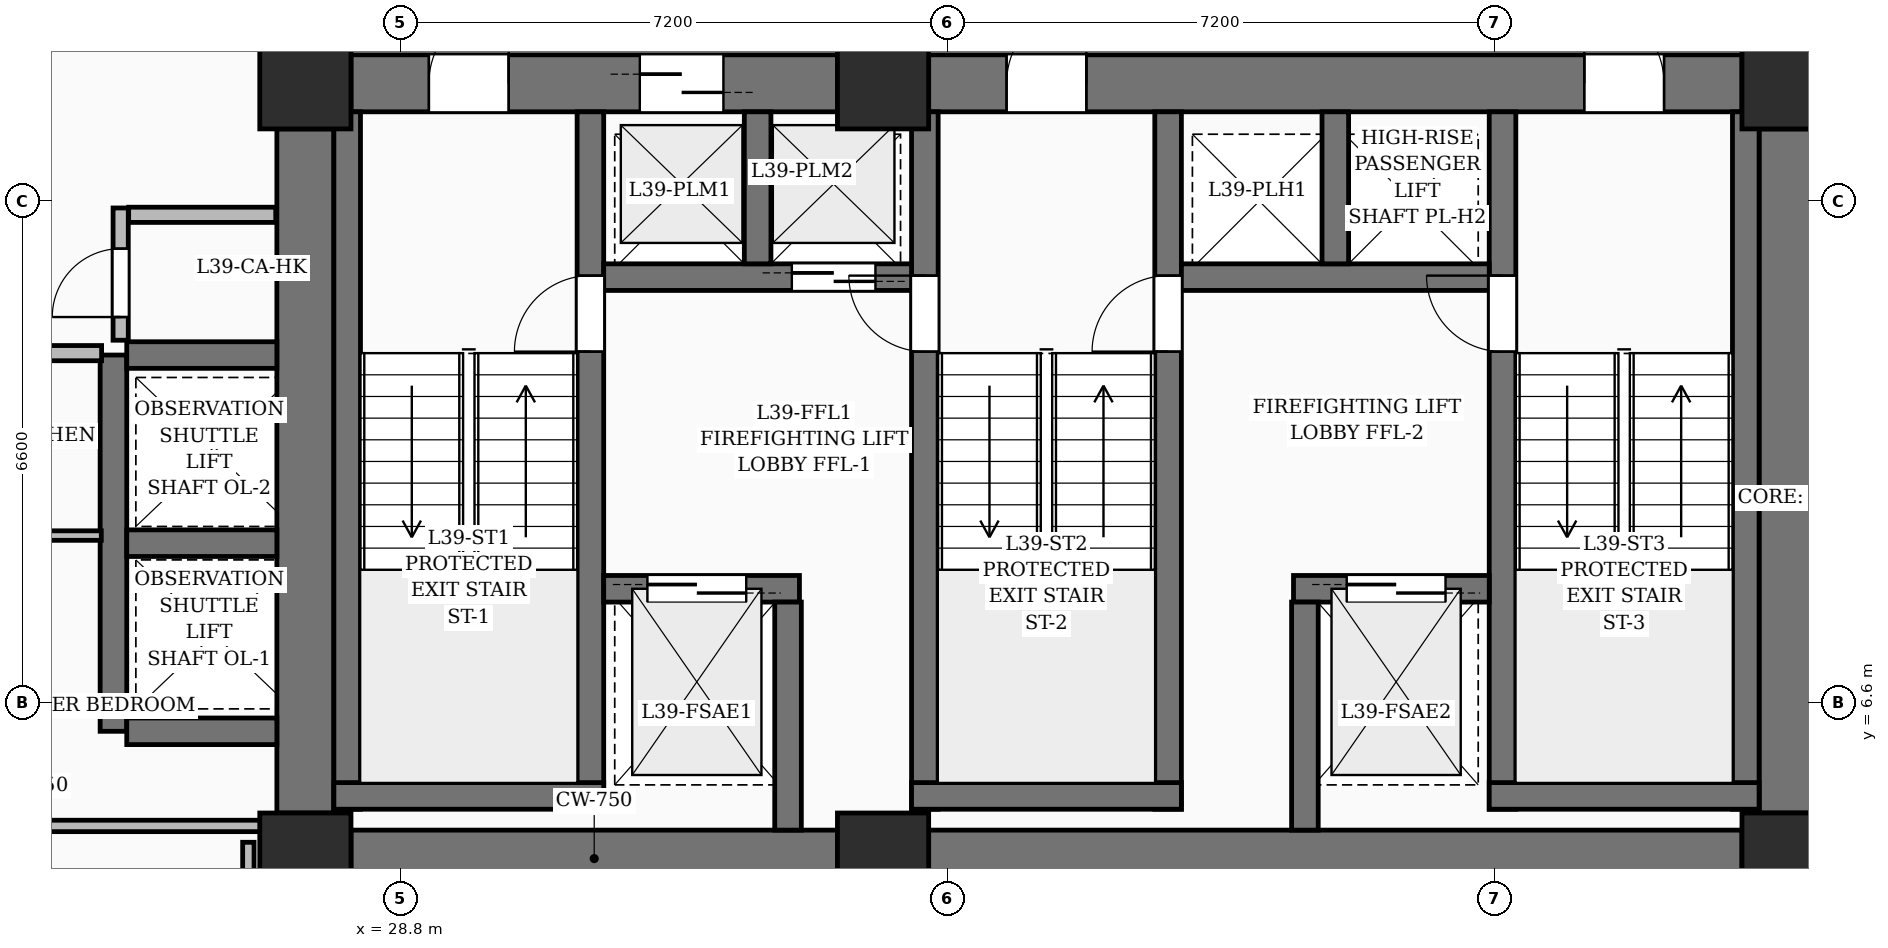
"""IFC4 building model, lengths in metres.
Left out: names, types, materials, properties, quantities, classifications, styles, units other than length and angle.
Written with IfcOpenShell. Run it as: python <this file> out.ifc"""

import sys

from ifc_helpers import new_model, si_unit, direction, frame, frame_2d, origin, origin_2d, place, context, subcontext, project, spatial, rectangle, extrude, element, fill, save


model = new_model("IFC4")
c1 = context("Model", 3, precision=1e-05, world=origin(), true_north=direction((0.0, 1.0)))
c2 = subcontext(c1, "Body", "Model", "MODEL_VIEW")
j1 = project(units=[si_unit("LENGTHUNIT", "METRE"), si_unit("PLANEANGLEUNIT", "RADIAN")], contexts=[c1])
p1 = place(None, origin())
s1 = spatial("IfcSite", under=j1, at=p1, CompositionType="ELEMENT")
p2 = place(p1, origin())
s2 = spatial("IfcBuilding", under=s1, at=p2, CompositionType="ELEMENT")
p3 = place(p2, frame((0.0, 0.0, 153.6)))
s3 = spatial("IfcBuildingStorey", under=s2, at=p3, CompositionType="ELEMENT", Elevation=153.6)
for number, where, z_axis, x_axis in (
    (1, (27.55, 4.55, 0.0), (0.0, 0.0, 1.0), (1.0, 0.0, 0.0)),
    (2, (35.15, 4.55, 0.0), (0.0, 0.0, 1.0), (1.0, 0.0, 0.0)),
    (3, (47.05, 4.55, 0.0), (0.0, 0.0, 1.0), (1.0, 0.0, 0.0)),
    (4, (27.55, 14.75, 0.0), (0.0, 0.0, 1.0), (1.0, 0.0, 0.0)),
    (5, (35.15, 14.75, 0.0), (0.0, 0.0, 1.0), (1.0, 0.0, 0.0)),
    (6, (47.05, 14.75, 0.0), (0.0, 0.0, 1.0), (1.0, 0.0, 0.0)),
):
    element("IfcColumn", number, at=place(p3, frame(where, z_axis=z_axis, x_axis=x_axis)), inside=s3, PredefinedType="COLUMN", context=c2, shape_type="SweptSolid", body=[
        extrude(rectangle(XDim=1.2, YDim=1.2, at=origin_2d()), origin(), (0.0, 0.0, 1.0), 3.6),
    ])
p4 = place(p3, frame((28.15, 4.55, 0.0), z_axis=(0.0, 0.0, 1.0), x_axis=(1.0, 0.0, 0.0)))
e7 = element("IfcWall", 7, at=p4, inside=s3, PredefinedType="SHEAR", context=c2, shape_type="SweptSolid", body=[
    extrude(rectangle(XDim=6.4, YDim=0.75, at=frame_2d((3.2, 0.0))), origin(), (0.0, 0.0, 1.0), 3.6),
])
p5 = place(p3, frame((35.75, 4.55, 0.0), z_axis=(0.0, 0.0, 1.0), x_axis=(1.0, 0.0, 0.0)))
e8 = element("IfcWall", 8, at=p5, inside=s3, PredefinedType="SHEAR", context=c2, shape_type="SweptSolid", body=[
    extrude(rectangle(XDim=10.7, YDim=0.75, at=frame_2d((5.35, 0.0))), origin(), (0.0, 0.0, 1.0), 3.6),
])
p6 = place(p3, frame((28.15, 14.75, 0.0), z_axis=(0.0, 0.0, 1.0), x_axis=(1.0, 0.0, 0.0)))
e9 = element("IfcWall", 9, at=p6, inside=s3, PredefinedType="SHEAR", context=c2, shape_type="SweptSolid", body=[
    extrude(rectangle(XDim=6.4, YDim=0.75, at=frame_2d((3.2, 0.0))), origin(), (0.0, 0.0, 1.0), 3.6),
])
p7 = place(p6, frame((1.025, 0.0, 0.0)))
e10 = element("IfcOpeningElement", 10, at=p7, cuts=e9, PredefinedType="OPENING", context=c2, shape_type="SweptSolid", body=[
    extrude(rectangle(XDim=1.05, YDim=2.15, at=frame_2d((0.525, 1.075))), frame((0.0, 0.385, 0.0), z_axis=(0.0, -1.0, 0.0), x_axis=(1.0, 0.0, 0.0)), (0.0, 0.0, 1.0), 0.77),
])
p8 = place(p6, frame((3.8, 0.0, 0.0)))
e11 = element("IfcOpeningElement", 11, at=p8, cuts=e9, PredefinedType="OPENING", context=c2, shape_type="SweptSolid", body=[
    extrude(rectangle(XDim=1.1, YDim=2.2, at=frame_2d((0.55, 1.1))), frame((0.0, 0.385, 0.0), z_axis=(0.0, -1.0, 0.0), x_axis=(1.0, 0.0, 0.0)), (0.0, 0.0, 1.0), 0.77),
])
p9 = place(p3, frame((35.75, 14.75, 0.0), z_axis=(0.0, 0.0, 1.0), x_axis=(1.0, 0.0, 0.0)))
e12 = element("IfcWall", 12, at=p9, inside=s3, PredefinedType="SHEAR", context=c2, shape_type="SweptSolid", body=[
    extrude(rectangle(XDim=10.7, YDim=0.75, at=frame_2d((5.35, 0.0))), origin(), (0.0, 0.0, 1.0), 3.6),
])
p10 = place(p9, frame((1.025, 0.0, 0.0)))
e13 = element("IfcOpeningElement", 13, at=p10, cuts=e12, PredefinedType="OPENING", context=c2, shape_type="SweptSolid", body=[
    extrude(rectangle(XDim=1.05, YDim=2.15, at=frame_2d((0.525, 1.075))), frame((0.0, 0.385, 0.0), z_axis=(0.0, -1.0, 0.0), x_axis=(1.0, 0.0, 0.0)), (0.0, 0.0, 1.0), 0.77),
])
p11 = place(p9, frame((8.625, 0.0, 0.0)))
e14 = element("IfcOpeningElement", 14, at=p11, cuts=e12, PredefinedType="OPENING", context=c2, shape_type="SweptSolid", body=[
    extrude(rectangle(XDim=1.05, YDim=2.15, at=frame_2d((0.525, 1.075))), frame((0.0, 0.385, 0.0), z_axis=(0.0, -1.0, 0.0), x_axis=(1.0, 0.0, 0.0)), (0.0, 0.0, 1.0), 0.77),
])
for number, where, z_axis, x_axis in (
    (15, (27.55, 5.15, 0.0), (0.0, 0.0, 1.0), (0.0, 1.0, 0.0)),
    (16, (47.05, 5.15, 0.0), (0.0, 0.0, 1.0), (0.0, 1.0, 0.0)),
):
    element("IfcWall", number, at=place(p3, frame(where, z_axis=z_axis, x_axis=x_axis)), inside=s3, PredefinedType="SHEAR", context=c2, shape_type="SweptSolid", body=[
        extrude(rectangle(XDim=9.0, YDim=0.75, at=frame_2d((4.5, 0.0))), origin(), (0.0, 0.0, 1.0), 3.6),
    ])
p12 = place(p3, frame((28.1, 5.2, 0.0), z_axis=(0.0, 0.0, 1.0), x_axis=(0.0, 1.0, 0.0)))
e17 = element("IfcWall", 17, at=p12, inside=s3, PredefinedType="SOLIDWALL", context=c2, shape_type="SweptSolid", body=[
    extrude(rectangle(XDim=9.175, YDim=0.35, at=frame_2d((4.587, 0.0))), origin(), (0.0, 0.0, 1.0), 3.6),
])
p13 = place(p3, frame((31.3, 5.2, 0.0), z_axis=(0.0, 0.0, 1.0), x_axis=(0.0, 1.0, 0.0)))
e18 = element("IfcWall", 18, at=p13, inside=s3, PredefinedType="SOLIDWALL", context=c2, shape_type="SweptSolid", body=[
    extrude(rectangle(XDim=9.175, YDim=0.35, at=frame_2d((4.587, 0.0))), origin(), (0.0, 0.0, 1.0), 3.6),
])
p14 = place(p13, frame((6.02, 0.0, 0.0)))
e19 = element("IfcOpeningElement", 19, at=p14, cuts=e18, PredefinedType="OPENING", context=c2, shape_type="SweptSolid", body=[
    extrude(rectangle(XDim=1.0, YDim=2.15, at=frame_2d((0.5, 1.075))), frame((0.0, 0.185, 0.0), z_axis=(0.0, -1.0, 0.0), x_axis=(1.0, 0.0, 0.0)), (0.0, 0.0, 1.0), 0.37),
])
p15 = place(p3, frame((27.925, 5.375, 0.0), z_axis=(0.0, 0.0, 1.0), x_axis=(1.0, 0.0, 0.0)))
e20 = element("IfcWall", 20, at=p15, inside=s3, PredefinedType="SOLIDWALL", context=c2, shape_type="SweptSolid", body=[
    extrude(rectangle(XDim=3.55, YDim=0.35, at=frame_2d((1.775, 0.0))), origin(), (0.0, 0.0, 1.0), 3.6),
])
p16 = place(p3, frame((35.7, 5.2, 0.0), z_axis=(0.0, 0.0, 1.0), x_axis=(0.0, 1.0, 0.0)))
e21 = element("IfcWall", 21, at=p16, inside=s3, PredefinedType="SOLIDWALL", context=c2, shape_type="SweptSolid", body=[
    extrude(rectangle(XDim=9.175, YDim=0.35, at=frame_2d((4.587, 0.0))), origin(), (0.0, 0.0, 1.0), 3.6),
])
p17 = place(p16, frame((6.02, 0.0, 0.0)))
e22 = element("IfcOpeningElement", 22, at=p17, cuts=e21, PredefinedType="OPENING", context=c2, shape_type="SweptSolid", body=[
    extrude(rectangle(XDim=1.0, YDim=2.15, at=frame_2d((0.5, 1.075))), frame((0.0, 0.185, 0.0), z_axis=(0.0, -1.0, 0.0), x_axis=(1.0, 0.0, 0.0)), (0.0, 0.0, 1.0), 0.37),
])
p18 = place(p3, frame((38.9, 5.2, 0.0), z_axis=(0.0, 0.0, 1.0), x_axis=(0.0, 1.0, 0.0)))
e23 = element("IfcWall", 23, at=p18, inside=s3, PredefinedType="SOLIDWALL", context=c2, shape_type="SweptSolid", body=[
    extrude(rectangle(XDim=9.175, YDim=0.35, at=frame_2d((4.587, 0.0))), origin(), (0.0, 0.0, 1.0), 3.6),
])
p19 = place(p18, frame((6.02, 0.0, 0.0)))
e24 = element("IfcOpeningElement", 24, at=p19, cuts=e23, PredefinedType="OPENING", context=c2, shape_type="SweptSolid", body=[
    extrude(rectangle(XDim=1.0, YDim=2.15, at=frame_2d((0.5, 1.075))), frame((0.0, 0.185, 0.0), z_axis=(0.0, -1.0, 0.0), x_axis=(1.0, 0.0, 0.0)), (0.0, 0.0, 1.0), 0.37),
])
p20 = place(p3, frame((35.525, 5.375, 0.0), z_axis=(0.0, 0.0, 1.0), x_axis=(1.0, 0.0, 0.0)))
e25 = element("IfcWall", 25, at=p20, inside=s3, PredefinedType="SOLIDWALL", context=c2, shape_type="SweptSolid", body=[
    extrude(rectangle(XDim=3.55, YDim=0.35, at=frame_2d((1.775, 0.0))), origin(), (0.0, 0.0, 1.0), 3.6),
])
p21 = place(p3, frame((43.3, 5.2, 0.0), z_axis=(0.0, 0.0, 1.0), x_axis=(0.0, 1.0, 0.0)))
e26 = element("IfcWall", 26, at=p21, inside=s3, PredefinedType="SOLIDWALL", context=c2, shape_type="SweptSolid", body=[
    extrude(rectangle(XDim=9.175, YDim=0.35, at=frame_2d((4.587, 0.0))), origin(), (0.0, 0.0, 1.0), 3.6),
])
p22 = place(p21, frame((6.02, 0.0, 0.0)))
e27 = element("IfcOpeningElement", 27, at=p22, cuts=e26, PredefinedType="OPENING", context=c2, shape_type="SweptSolid", body=[
    extrude(rectangle(XDim=1.0, YDim=2.15, at=frame_2d((0.5, 1.075))), frame((0.0, 0.185, 0.0), z_axis=(0.0, -1.0, 0.0), x_axis=(1.0, 0.0, 0.0)), (0.0, 0.0, 1.0), 0.37),
])
p23 = place(p3, frame((46.5, 5.2, 0.0), z_axis=(0.0, 0.0, 1.0), x_axis=(0.0, 1.0, 0.0)))
e28 = element("IfcWall", 28, at=p23, inside=s3, PredefinedType="SOLIDWALL", context=c2, shape_type="SweptSolid", body=[
    extrude(rectangle(XDim=9.175, YDim=0.35, at=frame_2d((4.587, 0.0))), origin(), (0.0, 0.0, 1.0), 3.6),
])
p24 = place(p3, frame((43.125, 5.375, 0.0), z_axis=(0.0, 0.0, 1.0), x_axis=(1.0, 0.0, 0.0)))
e29 = element("IfcWall", 29, at=p24, inside=s3, PredefinedType="SOLIDWALL", context=c2, shape_type="SweptSolid", body=[
    extrude(rectangle(XDim=3.55, YDim=0.35, at=frame_2d((1.775, 0.0))), origin(), (0.0, 0.0, 1.0), 3.6),
])
p25 = place(p3, frame((31.475, 8.1, 0.0), z_axis=(0.0, 0.0, 1.0), x_axis=(1.0, 0.0, 0.0)))
e30 = element("IfcWall", 30, at=p25, inside=s3, PredefinedType="SOLIDWALL", context=c2, shape_type="SweptSolid", body=[
    extrude(rectangle(XDim=2.575, YDim=0.35, at=frame_2d((1.288, 0.0))), origin(), (0.0, 0.0, 1.0), 3.6),
])
p26 = place(p25, frame((0.575, 0.0, 0.0)))
e31 = element("IfcOpeningElement", 31, at=p26, cuts=e30, PredefinedType="OPENING", context=c2, shape_type="SweptSolid", body=[
    extrude(rectangle(XDim=1.3, YDim=2.25, at=frame_2d((0.65, 1.125))), frame((0.0, 0.185, 0.0), z_axis=(0.0, -1.0, 0.0), x_axis=(1.0, 0.0, 0.0)), (0.0, 0.0, 1.0), 0.37),
])
p27 = place(p3, frame((40.55, 8.1, 0.0), z_axis=(0.0, 0.0, 1.0), x_axis=(1.0, 0.0, 0.0)))
e32 = element("IfcWall", 32, at=p27, inside=s3, PredefinedType="SOLIDWALL", context=c2, shape_type="SweptSolid", body=[
    extrude(rectangle(XDim=2.575, YDim=0.35, at=frame_2d((1.288, 0.0))), origin(), (0.0, 0.0, 1.0), 3.6),
])
p28 = place(p27, frame((0.7, 0.0, 0.0)))
e33 = element("IfcOpeningElement", 33, at=p28, cuts=e32, PredefinedType="OPENING", context=c2, shape_type="SweptSolid", body=[
    extrude(rectangle(XDim=1.3, YDim=2.25, at=frame_2d((0.65, 1.125))), frame((0.0, 0.185, 0.0), z_axis=(0.0, -1.0, 0.0), x_axis=(1.0, 0.0, 0.0)), (0.0, 0.0, 1.0), 0.37),
])
for number, where, z_axis, x_axis in (
    (34, (33.9, 4.925, 0.0), (0.0, 0.0, 1.0), (0.0, 1.0, 0.0)),
    (35, (40.7, 4.925, 0.0), (0.0, 0.0, 1.0), (0.0, 1.0, 0.0)),
):
    element("IfcWall", number, at=place(p3, frame(where, z_axis=z_axis, x_axis=x_axis)), inside=s3, PredefinedType="SOLIDWALL", context=c2, shape_type="SweptSolid", body=[
        extrude(rectangle(XDim=3.0, YDim=0.35, at=frame_2d((1.5, 0.0))), origin(), (0.0, 0.0, 1.0), 3.6),
    ])
p29 = place(p3, frame((31.475, 12.2, 0.0), z_axis=(0.0, 0.0, 1.0), x_axis=(1.0, 0.0, 0.0)))
e36 = element("IfcWall", 36, at=p29, inside=s3, PredefinedType="SOLIDWALL", context=c2, shape_type="SweptSolid", body=[
    extrude(rectangle(XDim=4.05, YDim=0.35, at=frame_2d((2.025, 0.0))), origin(), (0.0, 0.0, 1.0), 3.6),
])
p30 = place(p29, frame((2.475, 0.0, 0.0)))
e37 = element("IfcOpeningElement", 37, at=p30, cuts=e36, PredefinedType="OPENING", context=c2, shape_type="SweptSolid", body=[
    extrude(rectangle(XDim=1.1, YDim=2.2, at=frame_2d((0.55, 1.1))), frame((0.0, 0.185, 0.0), z_axis=(0.0, -1.0, 0.0), x_axis=(1.0, 0.0, 0.0)), (0.0, 0.0, 1.0), 0.37),
])
p31 = place(p3, frame((33.5, 12.375, 0.0), z_axis=(0.0, 0.0, 1.0), x_axis=(0.0, 1.0, 0.0)))
e38 = element("IfcWall", 38, at=p31, inside=s3, PredefinedType="SOLIDWALL", context=c2, shape_type="SweptSolid", body=[
    extrude(rectangle(XDim=2.0, YDim=0.35, at=frame_2d((1.0, 0.0))), origin(), (0.0, 0.0, 1.0), 3.6),
])
p32 = place(p3, frame((39.075, 12.2, 0.0), z_axis=(0.0, 0.0, 1.0), x_axis=(1.0, 0.0, 0.0)))
e39 = element("IfcWall", 39, at=p32, inside=s3, PredefinedType="SOLIDWALL", context=c2, shape_type="SweptSolid", body=[
    extrude(rectangle(XDim=4.05, YDim=0.35, at=frame_2d((2.025, 0.0))), origin(), (0.0, 0.0, 1.0), 3.6),
])
p33 = place(p3, frame((41.1, 12.375, 0.0), z_axis=(0.0, 0.0, 1.0), x_axis=(0.0, 1.0, 0.0)))
e40 = element("IfcWall", 40, at=p33, inside=s3, PredefinedType="SOLIDWALL", context=c2, shape_type="SweptSolid", body=[
    extrude(rectangle(XDim=2.0, YDim=0.35, at=frame_2d((1.0, 0.0))), origin(), (0.0, 0.0, 1.0), 3.6),
])
p34 = place(p3, frame((25.025, 6.225, 0.0), z_axis=(0.0, 0.0, 1.0), x_axis=(0.0, 1.0, 0.0)))
e41 = element("IfcWall", 41, at=p34, inside=s3, PredefinedType="SOLIDWALL", context=c2, shape_type="SweptSolid", body=[
    extrude(rectangle(XDim=4.95, YDim=0.35, at=frame_2d((2.475, 0.0))), origin(), (0.0, 0.0, 1.0), 3.6),
])
for number, where, z_axis, x_axis in (
    (42, (25.2, 6.225, 0.0), (0.0, 0.0, 1.0), (1.0, 0.0, 0.0)),
    (43, (25.2, 8.7, 0.0), (0.0, 0.0, 1.0), (1.0, 0.0, 0.0)),
    (44, (25.2, 11.175, 0.0), (0.0, 0.0, 1.0), (1.0, 0.0, 0.0)),
):
    element("IfcWall", number, at=place(p3, frame(where, z_axis=z_axis, x_axis=x_axis)), inside=s3, PredefinedType="SOLIDWALL", context=c2, shape_type="SweptSolid", body=[
        extrude(rectangle(XDim=1.975, YDim=0.35, at=frame_2d((0.988, 0.0))), origin(), (0.0, 0.0, 1.0), 3.6),
    ])
p35 = place(p3, frame((25.12, 11.37, 0.0), z_axis=(0.0, 0.0, 1.0), x_axis=(0.0, 1.0, 0.0)))
e45 = element("IfcWall", 45, at=p35, inside=s3, PredefinedType="PARTITIONING", context=c2, shape_type="SweptSolid", body=[
    extrude(rectangle(XDim=1.74, YDim=0.2, at=frame_2d((0.87, 0.0))), origin(), (0.0, 0.0, 1.0), 3.35),
])
p36 = place(p35, frame((0.305, 0.0, 0.0)))
e46 = element("IfcOpeningElement", 46, at=p36, cuts=e45, PredefinedType="OPENING", context=c2, shape_type="SweptSolid", body=[
    extrude(rectangle(XDim=0.9, YDim=2.1, at=frame_2d((0.45, 1.05))), frame((0.0, 0.11, 0.0), z_axis=(0.0, -1.0, 0.0), x_axis=(1.0, 0.0, 0.0)), (0.0, 0.0, 1.0), 0.22),
])
p37 = place(p3, frame((25.225, 13.02, 0.0), z_axis=(0.0, 0.0, 1.0), x_axis=(1.0, 0.0, 0.0)))
e47 = element("IfcWall", 47, at=p37, inside=s3, PredefinedType="PARTITIONING", context=c2, shape_type="SweptSolid", body=[
    extrude(rectangle(XDim=1.935, YDim=0.2, at=frame_2d((0.967, 0.0))), origin(), (0.0, 0.0, 1.0), 3.35),
])
p38 = place(p3, frame((21.485, 11.2, 0.0), z_axis=(0.0, 0.0, 1.0), x_axis=(1.0, 0.0, 0.0)))
e48 = element("IfcWall", 48, at=p38, inside=s3, PredefinedType="PARTITIONING", context=c2, shape_type="SweptSolid", body=[
    extrude(rectangle(XDim=3.384, YDim=0.2, at=frame_2d((1.692, 0.0))), origin(), (0.0, 0.0, 1.0), 3.35),
])
p39 = place(p3, frame((27.175, 4.98, 0.0), z_axis=(0.0, 0.0, 1.0), x_axis=(-1.0, 0.0, 0.0)))
e49 = element("IfcWall", 49, at=p39, inside=s3, PredefinedType="PARTITIONING", context=c2, shape_type="SweptSolid", body=[
    extrude(rectangle(XDim=6.365, YDim=0.15, at=frame_2d((3.183, 0.0))), origin(), (0.0, 0.0, 1.0), 2.57),
])
p40 = place(p3, frame((26.816, 1.899, 0.0), z_axis=(0.0, 0.0, 1.0), x_axis=(0.115732894013, 0.993280371921, 0.0)))
e50 = element("IfcWall", 50, at=p40, inside=s3, PredefinedType="PARTITIONING", context=c2, shape_type="SweptSolid", body=[
    extrude(rectangle(XDim=3.042, YDim=0.2, at=frame_2d((1.521, 0.0))), origin(), (0.0, 0.0, 1.0), 2.57),
])
p41 = place(p3, frame((20.798, 8.8, 0.0), z_axis=(0.0, 0.0, 1.0), x_axis=(1.0, 0.0, 0.0)))
e51 = element("IfcWall", 51, at=p41, inside=s3, PredefinedType="PARTITIONING", context=c2, shape_type="SweptSolid", body=[
    extrude(rectangle(XDim=4.067, YDim=0.125, at=frame_2d((2.034, 0.0))), origin(), (0.0, 0.0, 1.0), 2.393),
])
p42 = place(p3, frame((26.8, 3.849, 0.0), z_axis=(0.0, 0.0, 1.0), x_axis=(0.0, 1.0, 0.0)))
e52 = element("IfcWall", 52, at=p42, inside=s3, PredefinedType="PARTITIONING", context=c2, shape_type="SweptSolid", body=[
    extrude(rectangle(XDim=0.916, YDim=0.15, at=frame_2d((0.458, 0.0))), origin(), (0.0, 0.0, 1.0), 2.436),
])
p43 = place(p7, origin())
e53 = element("IfcDoor", 53, at=p43, inside=s3, OperationType="SINGLE_SWING_RIGHT", PredefinedType="DOOR", context=c2, shape_type="SweptSolid", body=[
    extrude(rectangle(XDim=1.05, YDim=2.15, at=frame_2d((0.525, 1.075))), frame((0.0, 0.025, 0.0), z_axis=(0.0, -1.0, 0.0), x_axis=(1.0, 0.0, 0.0)), (0.0, 0.0, 1.0), 0.05),
])
fill(e10, e53)
p44 = place(p10, origin())
e54 = element("IfcDoor", 54, at=p44, inside=s3, OperationType="SINGLE_SWING_RIGHT", PredefinedType="DOOR", context=c2, shape_type="SweptSolid", body=[
    extrude(rectangle(XDim=1.05, YDim=2.15, at=frame_2d((0.525, 1.075))), frame((0.0, 0.025, 0.0), z_axis=(0.0, -1.0, 0.0), x_axis=(1.0, 0.0, 0.0)), (0.0, 0.0, 1.0), 0.05),
])
fill(e13, e54)
p45 = place(p11, origin())
e55 = element("IfcDoor", 55, at=p45, inside=s3, OperationType="SINGLE_SWING_LEFT", PredefinedType="DOOR", context=c2, shape_type="SweptSolid", body=[
    extrude(rectangle(XDim=1.05, YDim=2.15, at=frame_2d((0.525, 1.075))), frame((0.0, 0.025, 0.0), z_axis=(0.0, -1.0, 0.0), x_axis=(1.0, 0.0, 0.0)), (0.0, 0.0, 1.0), 0.05),
])
fill(e14, e55)
p46 = place(p14, origin())
e56 = element("IfcDoor", 56, at=p46, inside=s3, OperationType="SINGLE_SWING_LEFT", PredefinedType="DOOR", context=c2, shape_type="SweptSolid", body=[
    extrude(rectangle(XDim=1.0, YDim=2.15, at=frame_2d((0.5, 1.075))), frame((0.0, 0.025, 0.0), z_axis=(0.0, -1.0, 0.0), x_axis=(1.0, 0.0, 0.0)), (0.0, 0.0, 1.0), 0.05),
])
fill(e19, e56)
p47 = place(p17, origin())
e57 = element("IfcDoor", 57, at=p47, inside=s3, OperationType="SINGLE_SWING_RIGHT", PredefinedType="DOOR", context=c2, shape_type="SweptSolid", body=[
    extrude(rectangle(XDim=1.0, YDim=2.15, at=frame_2d((0.5, 1.075))), frame((0.0, 0.025, 0.0), z_axis=(0.0, -1.0, 0.0), x_axis=(1.0, 0.0, 0.0)), (0.0, 0.0, 1.0), 0.05),
])
fill(e22, e57)
p48 = place(p19, origin())
e58 = element("IfcDoor", 58, at=p48, inside=s3, OperationType="SINGLE_SWING_LEFT", PredefinedType="DOOR", context=c2, shape_type="SweptSolid", body=[
    extrude(rectangle(XDim=1.0, YDim=2.15, at=frame_2d((0.5, 1.075))), frame((0.0, 0.025, 0.0), z_axis=(0.0, -1.0, 0.0), x_axis=(1.0, 0.0, 0.0)), (0.0, 0.0, 1.0), 0.05),
])
fill(e24, e58)
p49 = place(p22, origin())
e59 = element("IfcDoor", 59, at=p49, inside=s3, OperationType="SINGLE_SWING_RIGHT", PredefinedType="DOOR", context=c2, shape_type="SweptSolid", body=[
    extrude(rectangle(XDim=1.0, YDim=2.15, at=frame_2d((0.5, 1.075))), frame((0.0, 0.025, 0.0), z_axis=(0.0, -1.0, 0.0), x_axis=(1.0, 0.0, 0.0)), (0.0, 0.0, 1.0), 0.05),
])
fill(e27, e59)
p50 = place(p26, origin())
e60 = element("IfcDoor", 60, at=p50, inside=s3, OperationType="DOUBLE_DOOR_SLIDING", PredefinedType="DOOR", context=c2, shape_type="SweptSolid", body=[
    extrude(rectangle(XDim=1.3, YDim=2.25, at=frame_2d((0.65, 1.125))), frame((0.0, 0.025, 0.0), z_axis=(0.0, -1.0, 0.0), x_axis=(1.0, 0.0, 0.0)), (0.0, 0.0, 1.0), 0.05),
])
fill(e31, e60)
p51 = place(p28, origin())
e61 = element("IfcDoor", 61, at=p51, inside=s3, OperationType="DOUBLE_DOOR_SLIDING", PredefinedType="DOOR", context=c2, shape_type="SweptSolid", body=[
    extrude(rectangle(XDim=1.3, YDim=2.25, at=frame_2d((0.65, 1.125))), frame((0.0, 0.025, 0.0), z_axis=(0.0, -1.0, 0.0), x_axis=(1.0, 0.0, 0.0)), (0.0, 0.0, 1.0), 0.05),
])
fill(e33, e61)
p52 = place(p8, origin())
e62 = element("IfcDoor", 62, at=p52, inside=s3, OperationType="DOUBLE_DOOR_SLIDING", PredefinedType="DOOR", context=c2, shape_type="SweptSolid", body=[
    extrude(rectangle(XDim=1.1, YDim=2.2, at=frame_2d((0.55, 1.1))), frame((0.0, 0.025, 0.0), z_axis=(0.0, -1.0, 0.0), x_axis=(1.0, 0.0, 0.0)), (0.0, 0.0, 1.0), 0.05),
])
fill(e11, e62)
p53 = place(p30, origin())
e63 = element("IfcDoor", 63, at=p53, inside=s3, OperationType="DOUBLE_DOOR_SLIDING", PredefinedType="DOOR", context=c2, shape_type="SweptSolid", body=[
    extrude(rectangle(XDim=1.1, YDim=2.2, at=frame_2d((0.55, 1.1))), frame((0.0, 0.025, 0.0), z_axis=(0.0, -1.0, 0.0), x_axis=(1.0, 0.0, 0.0)), (0.0, 0.0, 1.0), 0.05),
])
fill(e37, e63)
p54 = place(p36, origin())
e64 = element("IfcDoor", 64, at=p54, inside=s3, OperationType="SINGLE_SWING_LEFT", PredefinedType="DOOR", context=c2, shape_type="SweptSolid", body=[
    extrude(rectangle(XDim=0.9, YDim=2.1, at=frame_2d((0.45, 1.05))), frame((0.0, 0.025, 0.0), z_axis=(0.0, -1.0, 0.0), x_axis=(1.0, 0.0, 0.0)), (0.0, 0.0, 1.0), 0.05),
])
fill(e46, e64)
save(model, sys.argv[1])
